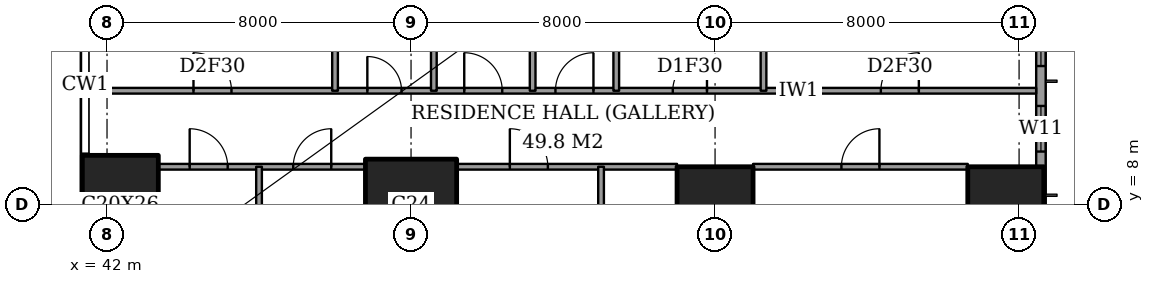
"""IFC4 building model, lengths in metres.
Left out: names, types, materials, properties, quantities, classifications, styles, units other than length and angle.
Written with IfcOpenShell. Run it as: python <this file> out.ifc"""

import sys

from ifc_helpers import new_model, si_unit, direction, frame, frame_2d, origin, origin_2d, place, context, subcontext, project, spatial, rectangle, extrude, element, fill, save


model = new_model("IFC4")
c1 = context("Model", 3, precision=1e-05, world=origin(), true_north=direction((0.0, 1.0)))
c2 = subcontext(c1, "Body", "Model", "MODEL_VIEW")
j1 = project(units=[si_unit("LENGTHUNIT", "METRE"), si_unit("PLANEANGLEUNIT", "RADIAN")], contexts=[c1])
p1 = place(None, origin())
s1 = spatial("IfcSite", under=j1, at=p1, CompositionType="ELEMENT")
p2 = place(p1, origin())
s2 = spatial("IfcBuilding", under=s1, at=p2, CompositionType="ELEMENT")
p3 = place(p2, frame((0.0, 0.0, 157.4)))
s3 = spatial("IfcBuildingStorey", under=s2, at=p3, CompositionType="ELEMENT", Elevation=157.4)
p4 = place(p3, frame((42.35, 8.0, 0.0), z_axis=(0.0, 0.0, 1.0), x_axis=(1.0, 0.0, 0.0)))
e1 = element("IfcColumn", 1, at=p4, inside=s3, PredefinedType="COLUMN", context=c2, shape_type="SweptSolid", body=[
    extrude(rectangle(XDim=2.0, YDim=2.6, at=origin_2d()), origin(), (0.0, 0.0, 1.0), 3.6),
])
p5 = place(p3, frame((50.0, 8.0, 0.0), z_axis=(0.0, 0.0, 1.0), x_axis=(1.0, 0.0, 0.0)))
e2 = element("IfcColumn", 2, at=p5, inside=s3, PredefinedType="COLUMN", context=c2, shape_type="SweptSolid", body=[
    extrude(rectangle(XDim=2.4, YDim=2.4, at=origin_2d()), origin(), (0.0, 0.0, 1.0), 3.6),
])
for number, where, z_axis, x_axis in (
    (3, (58.0, 8.0, 0.0), (0.0, 0.0, 1.0), (1.0, 0.0, 0.0)),
    (4, (65.65, 8.0, 0.0), (0.0, 0.0, 1.0), (1.0, 0.0, 0.0)),
):
    element("IfcColumn", number, at=place(p3, frame(where, z_axis=z_axis, x_axis=x_axis)), inside=s3, PredefinedType="COLUMN", context=c2, shape_type="SweptSolid", body=[
        extrude(rectangle(XDim=2.0, YDim=2.0, at=origin_2d()), origin(), (0.0, 0.0, 1.0), 3.6),
    ])
p6 = place(p3, frame((66.575, 3.175, 0.0), z_axis=(0.0, 0.0, 1.0), x_axis=(0.0, 1.0, 0.0)))
e5 = element("IfcWall", 5, at=p6, inside=s3, PredefinedType="SOLIDWALL", context=c2, shape_type="SweptSolid", body=[
    extrude(rectangle(XDim=41.65, YDim=0.25, at=frame_2d((20.825, 0.0))), origin(), (0.0, 0.0, 1.0), 3.6),
])
p7 = place(p6, frame((0.775, 0.0, 0.4)))
e6 = element("IfcOpeningElement", 6, at=p7, cuts=e5, PredefinedType="OPENING", context=c2, shape_type="SweptSolid", body=[
    extrude(rectangle(XDim=2.4, YDim=2.2, at=frame_2d((1.2, 1.1))), frame((0.0, 0.135, 0.0), z_axis=(0.0, -1.0, 0.0), x_axis=(1.0, 0.0, 0.0)), (0.0, 0.0, 1.0), 0.27),
])
p8 = place(p6, frame((6.225, 0.0, 0.4)))
e7 = element("IfcOpeningElement", 7, at=p8, cuts=e5, PredefinedType="OPENING", context=c2, shape_type="SweptSolid", body=[
    extrude(rectangle(XDim=1.2, YDim=2.2, at=frame_2d((0.6, 1.1))), frame((0.0, 0.135, 0.0), z_axis=(0.0, -1.0, 0.0), x_axis=(1.0, 0.0, 0.0)), (0.0, 0.0, 1.0), 0.27),
])
p9 = place(p6, frame((8.475, 0.0, 0.4)))
e8 = element("IfcOpeningElement", 8, at=p9, cuts=e5, PredefinedType="OPENING", context=c2, shape_type="SweptSolid", body=[
    extrude(rectangle(XDim=2.4, YDim=2.2, at=frame_2d((1.2, 1.1))), frame((0.0, 0.135, 0.0), z_axis=(0.0, -1.0, 0.0), x_axis=(1.0, 0.0, 0.0)), (0.0, 0.0, 1.0), 0.27),
])
p10 = place(p6, frame((15.775, 0.0, 0.4)))
e9 = element("IfcOpeningElement", 9, at=p10, cuts=e5, PredefinedType="OPENING", context=c2, shape_type="SweptSolid", body=[
    extrude(rectangle(XDim=2.4, YDim=2.2, at=frame_2d((1.2, 1.1))), frame((0.0, 0.135, 0.0), z_axis=(0.0, -1.0, 0.0), x_axis=(1.0, 0.0, 0.0)), (0.0, 0.0, 1.0), 0.27),
])
p11 = place(p6, frame((23.475, 0.0, 0.4)))
e10 = element("IfcOpeningElement", 10, at=p11, cuts=e5, PredefinedType="OPENING", context=c2, shape_type="SweptSolid", body=[
    extrude(rectangle(XDim=2.4, YDim=2.2, at=frame_2d((1.2, 1.1))), frame((0.0, 0.135, 0.0), z_axis=(0.0, -1.0, 0.0), x_axis=(1.0, 0.0, 0.0)), (0.0, 0.0, 1.0), 0.27),
])
p12 = place(p6, frame((30.975, 0.0, 0.4)))
e11 = element("IfcOpeningElement", 11, at=p12, cuts=e5, PredefinedType="OPENING", context=c2, shape_type="SweptSolid", body=[
    extrude(rectangle(XDim=2.4, YDim=2.2, at=frame_2d((1.2, 1.1))), frame((0.0, 0.135, 0.0), z_axis=(0.0, -1.0, 0.0), x_axis=(1.0, 0.0, 0.0)), (0.0, 0.0, 1.0), 0.27),
])
p13 = place(p6, frame((34.5, 0.0, 0.4)))
e12 = element("IfcOpeningElement", 12, at=p13, cuts=e5, PredefinedType="OPENING", context=c2, shape_type="SweptSolid", body=[
    extrude(rectangle(XDim=1.2, YDim=2.2, at=frame_2d((0.6, 1.1))), frame((0.0, 0.135, 0.0), z_axis=(0.0, -1.0, 0.0), x_axis=(1.0, 0.0, 0.0)), (0.0, 0.0, 1.0), 0.27),
])
p14 = place(p6, frame((38.475, 0.0, 0.4)))
e13 = element("IfcOpeningElement", 13, at=p14, cuts=e5, PredefinedType="OPENING", context=c2, shape_type="SweptSolid", body=[
    extrude(rectangle(XDim=2.4, YDim=2.2, at=frame_2d((1.2, 1.1))), frame((0.0, 0.135, 0.0), z_axis=(0.0, -1.0, 0.0), x_axis=(1.0, 0.0, 0.0)), (0.0, 0.0, 1.0), 0.27),
])
p15 = place(p3, frame((43.35, 9.0, 0.0), z_axis=(0.0, 0.0, 1.0), x_axis=(1.0, 0.0, 0.0)))
e14 = element("IfcWall", 14, at=p15, inside=s3, PredefinedType="PARTITIONING", context=c2, shape_type="SweptSolid", body=[
    extrude(rectangle(XDim=5.45, YDim=0.15, at=frame_2d((2.725, 0.0))), origin(), (0.0, 0.0, 1.0), 3.35),
])
p16 = place(p15, frame((3.55, 0.0, 0.0)))
e15 = element("IfcOpeningElement", 15, at=p16, cuts=e14, PredefinedType="OPENING", context=c2, shape_type="SweptSolid", body=[
    extrude(rectangle(XDim=1.0, YDim=2.1, at=frame_2d((0.5, 1.05))), frame((0.0, 0.085, 0.0), z_axis=(0.0, -1.0, 0.0), x_axis=(1.0, 0.0, 0.0)), (0.0, 0.0, 1.0), 0.17),
])
p17 = place(p15, frame((0.825, 0.0, 0.0)))
e16 = element("IfcOpeningElement", 16, at=p17, cuts=e14, PredefinedType="OPENING", context=c2, shape_type="SweptSolid", body=[
    extrude(rectangle(XDim=1.0, YDim=2.1, at=frame_2d((0.5, 1.05))), frame((0.0, 0.085, 0.0), z_axis=(0.0, -1.0, 0.0), x_axis=(1.0, 0.0, 0.0)), (0.0, 0.0, 1.0), 0.17),
])
p18 = place(p3, frame((51.2, 9.0, 0.0), z_axis=(0.0, 0.0, 1.0), x_axis=(1.0, 0.0, 0.0)))
e17 = element("IfcWall", 17, at=p18, inside=s3, PredefinedType="PARTITIONING", context=c2, shape_type="SweptSolid", body=[
    extrude(rectangle(XDim=5.8, YDim=0.15, at=frame_2d((2.9, 0.0))), origin(), (0.0, 0.0, 1.0), 3.35),
])
p19 = place(p18, frame((1.4, 0.0, 0.0)))
e18 = element("IfcOpeningElement", 18, at=p19, cuts=e17, PredefinedType="OPENING", context=c2, shape_type="SweptSolid", body=[
    extrude(rectangle(XDim=1.0, YDim=2.1, at=frame_2d((0.5, 1.05))), frame((0.0, 0.085, 0.0), z_axis=(0.0, -1.0, 0.0), x_axis=(1.0, 0.0, 0.0)), (0.0, 0.0, 1.0), 0.17),
])
p20 = place(p3, frame((59.0, 9.0, 0.0), z_axis=(0.0, 0.0, 1.0), x_axis=(1.0, 0.0, 0.0)))
e19 = element("IfcWall", 19, at=p20, inside=s3, PredefinedType="PARTITIONING", context=c2, shape_type="SweptSolid", body=[
    extrude(rectangle(XDim=5.65, YDim=0.15, at=frame_2d((2.825, 0.0))), origin(), (0.0, 0.0, 1.0), 3.35),
])
p21 = place(p20, frame((2.325, 0.0, 0.0)))
e20 = element("IfcOpeningElement", 20, at=p21, cuts=e19, PredefinedType="OPENING", context=c2, shape_type="SweptSolid", body=[
    extrude(rectangle(XDim=1.0, YDim=2.1, at=frame_2d((0.5, 1.05))), frame((0.0, 0.085, 0.0), z_axis=(0.0, -1.0, 0.0), x_axis=(1.0, 0.0, 0.0)), (0.0, 0.0, 1.0), 0.17),
])
p22 = place(p3, frame((41.439, 11.0, 0.0), z_axis=(0.0, 0.0, 1.0), x_axis=(1.0, 0.0, 0.0)))
e21 = element("IfcWall", 21, at=p22, inside=s3, PredefinedType="PARTITIONING", context=c2, shape_type="SweptSolid", body=[
    extrude(rectangle(XDim=25.011, YDim=0.15, at=frame_2d((12.505, 0.0))), origin(), (0.0, 0.0, 1.0), 3.35),
])
p23 = place(p22, frame((12.361, 0.0, 0.0)))
e22 = element("IfcOpeningElement", 22, at=p23, cuts=e21, PredefinedType="OPENING", context=c2, shape_type="SweptSolid", body=[
    extrude(rectangle(XDim=1.0, YDim=2.1, at=frame_2d((0.5, 1.05))), frame((0.0, 0.085, 0.0), z_axis=(0.0, -1.0, 0.0), x_axis=(1.0, 0.0, 0.0)), (0.0, 0.0, 1.0), 0.17),
])
p24 = place(p22, frame((20.924, 0.0, 0.0)))
e23 = element("IfcOpeningElement", 23, at=p24, cuts=e21, PredefinedType="OPENING", context=c2, shape_type="SweptSolid", body=[
    extrude(rectangle(XDim=1.0, YDim=2.1, at=frame_2d((0.5, 1.05))), frame((0.0, 0.085, 0.0), z_axis=(0.0, -1.0, 0.0), x_axis=(1.0, 0.0, 0.0)), (0.0, 0.0, 1.0), 0.17),
])
p25 = place(p22, frame((15.448, 0.0, 0.0)))
e24 = element("IfcOpeningElement", 24, at=p25, cuts=e21, PredefinedType="OPENING", context=c2, shape_type="SweptSolid", body=[
    extrude(rectangle(XDim=0.9, YDim=2.1, at=frame_2d((0.45, 1.05))), frame((0.0, 0.085, 0.0), z_axis=(0.0, -1.0, 0.0), x_axis=(1.0, 0.0, 0.0)), (0.0, 0.0, 1.0), 0.17),
])
p26 = place(p22, frame((9.961, 0.0, 0.0)))
e25 = element("IfcOpeningElement", 25, at=p26, cuts=e21, PredefinedType="OPENING", context=c2, shape_type="SweptSolid", body=[
    extrude(rectangle(XDim=1.0, YDim=2.1, at=frame_2d((0.5, 1.05))), frame((0.0, 0.085, 0.0), z_axis=(0.0, -1.0, 0.0), x_axis=(1.0, 0.0, 0.0)), (0.0, 0.0, 1.0), 0.17),
])
p27 = place(p22, frame((7.411, 0.0, 0.0)))
e26 = element("IfcOpeningElement", 26, at=p27, cuts=e21, PredefinedType="OPENING", context=c2, shape_type="SweptSolid", body=[
    extrude(rectangle(XDim=0.9, YDim=2.1, at=frame_2d((0.45, 1.05))), frame((0.0, 0.085, 0.0), z_axis=(0.0, -1.0, 0.0), x_axis=(1.0, 0.0, 0.0)), (0.0, 0.0, 1.0), 0.17),
])
p28 = place(p22, frame((2.836, 0.0, 0.0)))
e27 = element("IfcOpeningElement", 27, at=p28, cuts=e21, PredefinedType="OPENING", context=c2, shape_type="SweptSolid", body=[
    extrude(rectangle(XDim=1.0, YDim=2.1, at=frame_2d((0.5, 1.05))), frame((0.0, 0.085, 0.0), z_axis=(0.0, -1.0, 0.0), x_axis=(1.0, 0.0, 0.0)), (0.0, 0.0, 1.0), 0.17),
])
p29 = place(p3, frame((46.0, -0.45, 0.0), z_axis=(0.0, 0.0, 1.0), x_axis=(0.0, 1.0, 0.0)))
e28 = element("IfcWall", 28, at=p29, inside=s3, PredefinedType="PARTITIONING", context=c2, shape_type="SweptSolid", body=[
    extrude(rectangle(XDim=9.45, YDim=0.15, at=frame_2d((4.725, 0.0))), origin(), (0.0, 0.0, 1.0), 3.35),
])
p30 = place(p3, frame((48.0, 11.0, 0.0), z_axis=(0.0, 0.0, 1.0), x_axis=(0.0, 1.0, 0.0)))
e29 = element("IfcWall", 29, at=p30, inside=s3, PredefinedType="PARTITIONING", context=c2, shape_type="SweptSolid", body=[
    extrude(rectangle(XDim=6.5, YDim=0.15, at=frame_2d((3.25, 0.0))), origin(), (0.0, 0.0, 1.0), 3.35),
])
p31 = place(p3, frame((50.6, 11.0, 0.0), z_axis=(0.0, 0.0, 1.0), x_axis=(0.0, 1.0, 0.0)))
e30 = element("IfcWall", 30, at=p31, inside=s3, PredefinedType="PARTITIONING", context=c2, shape_type="SweptSolid", body=[
    extrude(rectangle(XDim=3.8, YDim=0.15, at=frame_2d((1.9, 0.0))), origin(), (0.0, 0.0, 1.0), 3.35),
])
p32 = place(p3, frame((53.2, 11.0, 0.0), z_axis=(0.0, 0.0, 1.0), x_axis=(0.0, 1.0, 0.0)))
e31 = element("IfcWall", 31, at=p32, inside=s3, PredefinedType="PARTITIONING", context=c2, shape_type="SweptSolid", body=[
    extrude(rectangle(XDim=6.5, YDim=0.15, at=frame_2d((3.25, 0.0))), origin(), (0.0, 0.0, 1.0), 3.35),
])
p33 = place(p3, frame((55.0, -0.45, 0.0), z_axis=(0.0, 0.0, 1.0), x_axis=(0.0, 1.0, 0.0)))
e32 = element("IfcWall", 32, at=p33, inside=s3, PredefinedType="PARTITIONING", context=c2, shape_type="SweptSolid", body=[
    extrude(rectangle(XDim=9.45, YDim=0.15, at=frame_2d((4.725, 0.0))), origin(), (0.0, 0.0, 1.0), 3.35),
])
p34 = place(p3, frame((55.4, 11.0, 0.0), z_axis=(0.0, 0.0, 1.0), x_axis=(0.0, 1.0, 0.0)))
e33 = element("IfcWall", 33, at=p34, inside=s3, PredefinedType="PARTITIONING", context=c2, shape_type="SweptSolid", body=[
    extrude(rectangle(XDim=10.6, YDim=0.15, at=frame_2d((5.3, 0.0))), origin(), (0.0, 0.0, 1.0), 3.35),
])
p35 = place(p34, frame((8.05, 0.0, 0.0)))
e34 = element("IfcOpeningElement", 34, at=p35, cuts=e33, PredefinedType="OPENING", context=c2, shape_type="SweptSolid", body=[
    extrude(rectangle(XDim=1.0, YDim=2.1, at=frame_2d((0.5, 1.05))), frame((0.0, 0.085, 0.0), z_axis=(0.0, -1.0, 0.0), x_axis=(1.0, 0.0, 0.0)), (0.0, 0.0, 1.0), 0.17),
])
p36 = place(p3, frame((59.275, 11.0, 0.0), z_axis=(0.0, 0.0, 1.0), x_axis=(0.0, 1.0, 0.0)))
e35 = element("IfcWall", 35, at=p36, inside=s3, PredefinedType="PARTITIONING", context=c2, shape_type="SweptSolid", body=[
    extrude(rectangle(XDim=3.8, YDim=0.15, at=frame_2d((1.9, 0.0))), origin(), (0.0, 0.0, 1.0), 3.35),
])
p37 = place(p8, origin())
e36 = element("IfcWindow", 36, at=p37, inside=s3, PartitioningType="SINGLE_PANEL", PredefinedType="WINDOW", context=c2, shape_type="SweptSolid", body=[
    extrude(rectangle(XDim=1.2, YDim=2.2, at=frame_2d((0.6, 1.1))), frame((0.0, 0.03, 0.0), z_axis=(0.0, -1.0, 0.0), x_axis=(1.0, 0.0, 0.0)), (0.0, 0.0, 1.0), 0.06),
])
fill(e7, e36)
p38 = place(p9, origin())
e37 = element("IfcWindow", 37, at=p38, inside=s3, PartitioningType="SINGLE_PANEL", PredefinedType="WINDOW", context=c2, shape_type="SweptSolid", body=[
    extrude(rectangle(XDim=2.4, YDim=2.2, at=frame_2d((1.2, 1.1))), frame((0.0, 0.03, 0.0), z_axis=(0.0, -1.0, 0.0), x_axis=(1.0, 0.0, 0.0)), (0.0, 0.0, 1.0), 0.06),
])
fill(e8, e37)
p39 = place(p21, origin())
e38 = element("IfcDoor", 38, at=p39, inside=s3, OperationType="SINGLE_SWING_LEFT", PredefinedType="DOOR", context=c2, shape_type="SweptSolid", body=[
    extrude(rectangle(XDim=1.0, YDim=2.1, at=frame_2d((0.5, 1.05))), frame((0.0, 0.025, 0.0), z_axis=(0.0, -1.0, 0.0), x_axis=(1.0, 0.0, 0.0)), (0.0, 0.0, 1.0), 0.05),
])
fill(e20, e38)
p40 = place(p19, origin())
e39 = element("IfcDoor", 39, at=p40, inside=s3, OperationType="SINGLE_SWING_RIGHT", PredefinedType="DOOR", context=c2, shape_type="SweptSolid", body=[
    extrude(rectangle(XDim=1.0, YDim=2.1, at=frame_2d((0.5, 1.05))), frame((0.0, 0.025, 0.0), z_axis=(0.0, -1.0, 0.0), x_axis=(1.0, 0.0, 0.0)), (0.0, 0.0, 1.0), 0.05),
])
fill(e18, e39)
p41 = place(p16, origin())
e40 = element("IfcDoor", 40, at=p41, inside=s3, OperationType="SINGLE_SWING_LEFT", PredefinedType="DOOR", context=c2, shape_type="SweptSolid", body=[
    extrude(rectangle(XDim=1.0, YDim=2.1, at=frame_2d((0.5, 1.05))), frame((0.0, 0.025, 0.0), z_axis=(0.0, -1.0, 0.0), x_axis=(1.0, 0.0, 0.0)), (0.0, 0.0, 1.0), 0.05),
])
fill(e15, e40)
p42 = place(p17, origin())
e41 = element("IfcDoor", 41, at=p42, inside=s3, OperationType="SINGLE_SWING_RIGHT", PredefinedType="DOOR", context=c2, shape_type="SweptSolid", body=[
    extrude(rectangle(XDim=1.0, YDim=2.1, at=frame_2d((0.5, 1.05))), frame((0.0, 0.025, 0.0), z_axis=(0.0, -1.0, 0.0), x_axis=(1.0, 0.0, 0.0)), (0.0, 0.0, 1.0), 0.05),
])
fill(e16, e41)
p43 = place(p23, origin())
e42 = element("IfcDoor", 42, at=p43, inside=s3, OperationType="SINGLE_SWING_LEFT", PredefinedType="DOOR", context=c2, shape_type="SweptSolid", body=[
    extrude(rectangle(XDim=1.0, YDim=2.1, at=frame_2d((0.5, 1.05))), frame((0.0, 0.025, 0.0), z_axis=(0.0, -1.0, 0.0), x_axis=(1.0, 0.0, 0.0)), (0.0, 0.0, 1.0), 0.05),
])
fill(e22, e42)
p44 = place(p24, origin())
e43 = element("IfcDoor", 43, at=p44, inside=s3, OperationType="SINGLE_SWING_LEFT", PredefinedType="DOOR", context=c2, shape_type="SweptSolid", body=[
    extrude(rectangle(XDim=1.0, YDim=2.1, at=frame_2d((0.5, 1.05))), frame((0.0, 0.025, 0.0), z_axis=(0.0, -1.0, 0.0), x_axis=(1.0, 0.0, 0.0)), (0.0, 0.0, 1.0), 0.05),
])
fill(e23, e43)
p45 = place(p25, origin())
e44 = element("IfcDoor", 44, at=p45, inside=s3, OperationType="SINGLE_SWING_LEFT", PredefinedType="DOOR", context=c2, shape_type="SweptSolid", body=[
    extrude(rectangle(XDim=0.9, YDim=2.1, at=frame_2d((0.45, 1.05))), frame((0.0, 0.025, 0.0), z_axis=(0.0, -1.0, 0.0), x_axis=(1.0, 0.0, 0.0)), (0.0, 0.0, 1.0), 0.05),
])
fill(e24, e44)
p46 = place(p26, origin())
e45 = element("IfcDoor", 45, at=p46, inside=s3, OperationType="SINGLE_SWING_RIGHT", PredefinedType="DOOR", context=c2, shape_type="SweptSolid", body=[
    extrude(rectangle(XDim=1.0, YDim=2.1, at=frame_2d((0.5, 1.05))), frame((0.0, 0.025, 0.0), z_axis=(0.0, -1.0, 0.0), x_axis=(1.0, 0.0, 0.0)), (0.0, 0.0, 1.0), 0.05),
])
fill(e25, e45)
p47 = place(p27, origin())
e46 = element("IfcDoor", 46, at=p47, inside=s3, OperationType="SINGLE_SWING_RIGHT", PredefinedType="DOOR", context=c2, shape_type="SweptSolid", body=[
    extrude(rectangle(XDim=0.9, YDim=2.1, at=frame_2d((0.45, 1.05))), frame((0.0, 0.025, 0.0), z_axis=(0.0, -1.0, 0.0), x_axis=(1.0, 0.0, 0.0)), (0.0, 0.0, 1.0), 0.05),
])
fill(e26, e46)
p48 = place(p28, origin())
e47 = element("IfcDoor", 47, at=p48, inside=s3, OperationType="SINGLE_SWING_RIGHT", PredefinedType="DOOR", context=c2, shape_type="SweptSolid", body=[
    extrude(rectangle(XDim=1.0, YDim=2.1, at=frame_2d((0.5, 1.05))), frame((0.0, 0.025, 0.0), z_axis=(0.0, -1.0, 0.0), x_axis=(1.0, 0.0, 0.0)), (0.0, 0.0, 1.0), 0.05),
])
fill(e27, e47)
save(model, sys.argv[1])
